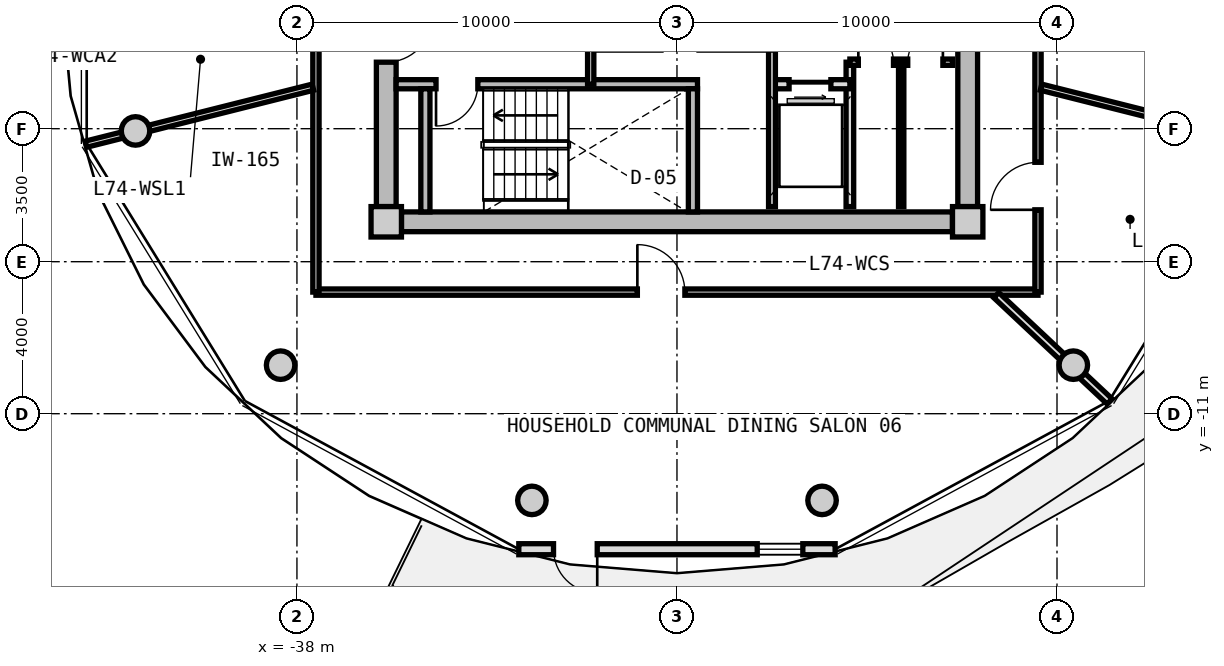
"""IFC4 building model, lengths in metres.
Left out: names, types, materials, properties, quantities, classifications, styles, units other than length and angle.
Written with IfcOpenShell. Run it as: python <this file> out.ifc"""

import sys

from ifc_helpers import new_model, si_unit, direction, frame, frame_2d, origin, origin_2d, place, context, subcontext, project, spatial, rectangle, circle, extrude, source, transform, mapped, element, fill, save


model = new_model("IFC4")
c1 = context("Model", 3, precision=1e-05, world=origin(), true_north=direction((0.0, 1.0)))
c2 = subcontext(c1, "Body", "Model", "MODEL_VIEW")
j1 = project(units=[si_unit("LENGTHUNIT", "METRE"), si_unit("PLANEANGLEUNIT", "RADIAN")], contexts=[c1])
p1 = place(None, origin())
s1 = spatial("IfcSite", under=j1, at=p1, CompositionType="ELEMENT")
p2 = place(p1, origin())
s2 = spatial("IfcBuilding", under=s1, at=p2, CompositionType="ELEMENT")
p3 = place(p2, frame((0.0, 0.0, 238.3)))
s3 = spatial("IfcBuildingStorey", under=s2, at=p3, CompositionType="ELEMENT", Elevation=238.3)
m1 = source(origin(), c2, "Body", "SweptSolid", [
    extrude(rectangle(XDim=0.8, YDim=0.8, at=origin_2d()), origin(), (0.0, 0.0, 1.0), 3.05),
])
for number, where, z_axis, x_axis in (
    (1, (-35.65, -5.95, 0.0), (0.0, 0.0, 1.0), (1.0, 0.0, 0.0)),
    (2, (-20.35, -5.95, 0.0), (0.0, 0.0, 1.0), (1.0, 0.0, 0.0)),
):
    element("IfcColumn", number, at=place(p3, frame(where, z_axis=z_axis, x_axis=x_axis)), inside=s3, PredefinedType="COLUMN", context=c2, shape_type="MappedRepresentation", body=[
        mapped(m1, transform((0.0, 0.0, 0.0), x_axis=(1.0, 0.0, 0.0), y_axis=(0.0, 1.0, 0.0), z_axis=(0.0, 0.0, 1.0), scale=1.0)),
    ])
m2 = source(origin(), c2, "Body", "SweptSolid", [
    extrude(rectangle(XDim=14.5, YDim=0.52, at=frame_2d((7.25, 0.0))), origin(), (0.0, 0.0, 1.0), 2.81),
])
p4 = place(p3, frame((-20.75, -5.95, 0.0), z_axis=(0.0, 0.0, 1.0), x_axis=(-1.0, 0.0, 0.0)))
e3 = element("IfcWall", 3, at=p4, inside=s3, PredefinedType="SHEAR", context=c2, shape_type="MappedRepresentation", body=[
    mapped(m2, transform((0.0, 0.0, 0.0), x_axis=(1.0, 0.0, 0.0), y_axis=(0.0, 1.0, 0.0), z_axis=(0.0, 0.0, 1.0), scale=1.0)),
])
m3 = source(origin(), c2, "Body", "SweptSolid", [
    extrude(rectangle(XDim=11.1, YDim=0.52, at=frame_2d((5.55, 0.0))), origin(), (0.0, 0.0, 1.0), 2.81),
])
p5 = place(p3, frame((-35.65, -5.55, 0.0), z_axis=(0.0, 0.0, 1.0), x_axis=(0.0, 1.0, 0.0)))
e4 = element("IfcWall", 4, at=p5, inside=s3, PredefinedType="SHEAR", context=c2, shape_type="MappedRepresentation", body=[
    mapped(m3, transform((0.0, 0.0, 0.0), x_axis=(1.0, 0.0, 0.0), y_axis=(0.0, 1.0, 0.0), z_axis=(0.0, 0.0, 1.0), scale=1.0)),
])
p6 = place(p5, frame((3.8, 0.0, 0.0)))
e5 = element("IfcOpeningElement", 5, at=p6, cuts=e4, PredefinedType="OPENING", context=c2, shape_type="SweptSolid", body=[
    extrude(rectangle(XDim=1.2, YDim=2.15, at=frame_2d((0.6, 1.075))), frame((0.0, 0.27, 0.0), z_axis=(0.0, -1.0, 0.0), x_axis=(1.0, 0.0, 0.0)), (0.0, 0.0, 1.0), 0.54),
])
p7 = place(p3, frame((-20.35, 5.55, 0.0), z_axis=(0.0, 0.0, 1.0), x_axis=(0.0, -1.0, 0.0)))
e6 = element("IfcWall", 6, at=p7, inside=s3, PredefinedType="SHEAR", context=c2, shape_type="MappedRepresentation", body=[
    mapped(m3, transform((0.0, 0.0, 0.0), x_axis=(1.0, 0.0, 0.0), y_axis=(0.0, 1.0, 0.0), z_axis=(0.0, 0.0, 1.0), scale=1.0)),
])
p8 = place(p7, frame((5.65, 0.0, 0.0)))
e7 = element("IfcOpeningElement", 7, at=p8, cuts=e6, PredefinedType="OPENING", context=c2, shape_type="SweptSolid", body=[
    extrude(rectangle(XDim=1.2, YDim=2.15, at=frame_2d((0.6, 1.075))), frame((0.0, 0.27, 0.0), z_axis=(0.0, -1.0, 0.0), x_axis=(1.0, 0.0, 0.0)), (0.0, 0.0, 1.0), 0.54),
])
m4 = source(origin(), c2, "Body", "SweptSolid", [
    extrude(circle(Radius=0.375, at=origin_2d()), origin(), (0.0, 0.0, 1.0), 3.05),
])
for number, where, z_axis, x_axis in (
    (8, (-42.247, -3.559, 0.0), (0.0, 0.0, 1.0), (1.0, 0.0, 0.0)),
    (9, (-38.43, -9.723, 0.0), (0.0, 0.0, 1.0), (1.0, 0.0, 0.0)),
    (10, (-31.818, -13.281, 0.0), (0.0, 0.0, 1.0), (1.0, 0.0, 0.0)),
    (11, (-24.182, -13.281, 0.0), (0.0, 0.0, 1.0), (1.0, 0.0, 0.0)),
    (12, (-17.57, -9.723, 0.0), (0.0, 0.0, 1.0), (1.0, 0.0, 0.0)),
):
    element("IfcColumn", number, at=place(p3, frame(where, z_axis=z_axis, x_axis=x_axis)), inside=s3, PredefinedType="COLUMN", context=c2, shape_type="MappedRepresentation", body=[
        mapped(m4, transform((0.0, 0.0, 0.0), x_axis=(1.0, 0.0, 0.0), y_axis=(0.0, 1.0, 0.0), z_axis=(0.0, 0.0, 1.0), scale=1.0)),
    ])
m5 = source(origin(), c2, "Body", "SweptSolid", [
    extrude(rectangle(XDim=8.324, YDim=0.29, at=frame_2d((4.162, 0.0))), origin(), (0.0, 0.0, 1.0), 2.81),
])
p9 = place(p3, frame((-23.838, -14.566, 0.0), z_axis=(0.0, 0.0, 1.0), x_axis=(-1.0, 0.0, 0.0)))
e13 = element("IfcWall", 13, at=p9, inside=s3, PredefinedType="SOLIDWALL", context=c2, shape_type="MappedRepresentation", body=[
    mapped(m5, transform((0.0, 0.0, 0.0), x_axis=(1.0, 0.0, 0.0), y_axis=(0.0, 1.0, 0.0), z_axis=(0.0, 0.0, 1.0), scale=1.0)),
])
p10 = place(p9, frame((6.26, 0.0, 0.0)))
e14 = element("IfcOpeningElement", 14, at=p10, cuts=e13, PredefinedType="OPENING", context=c2, shape_type="SweptSolid", body=[
    extrude(rectangle(XDim=1.15, YDim=2.25, at=frame_2d((0.575, 1.125))), frame((0.0, 0.155, 0.0), z_axis=(0.0, -1.0, 0.0), x_axis=(1.0, 0.0, 0.0)), (0.0, 0.0, 1.0), 0.31),
])
p11 = place(p9, frame((0.85, 0.0, 0.85)))
e15 = element("IfcOpeningElement", 15, at=p11, cuts=e13, PredefinedType="OPENING", context=c2, shape_type="SweptSolid", body=[
    extrude(rectangle(XDim=1.2, YDim=1.5, at=frame_2d((0.6, 0.75))), frame((0.0, 0.155, 0.0), z_axis=(0.0, -1.0, 0.0), x_axis=(1.0, 0.0, 0.0)), (0.0, 0.0, 1.0), 0.31),
])
m6 = source(origin(), c2, "Body", "SweptSolid", [
    extrude(rectangle(XDim=7.93, YDim=0.24, at=frame_2d((3.965, 0.0))), origin(), (0.0, 0.0, 1.0), 2.81),
])
p12 = place(p3, frame((-35.39, -2.33, 0.0), z_axis=(0.0, 0.0, 1.0), x_axis=(1.0, 0.0, 0.0)))
e16 = element("IfcWall", 16, at=p12, inside=s3, PredefinedType="PARTITIONING", context=c2, shape_type="MappedRepresentation", body=[
    mapped(m6, transform((0.0, 0.0, 0.0), x_axis=(1.0, 0.0, 0.0), y_axis=(0.0, 1.0, 0.0), z_axis=(0.0, 0.0, 1.0), scale=1.0)),
])
p13 = place(p12, frame((1.05, 0.0, 0.0)))
e17 = element("IfcOpeningElement", 17, at=p13, cuts=e16, PredefinedType="OPENING", context=c2, shape_type="SweptSolid", body=[
    extrude(rectangle(XDim=1.1, YDim=2.15, at=frame_2d((0.55, 1.075))), frame((0.0, 0.13, 0.0), z_axis=(0.0, -1.0, 0.0), x_axis=(1.0, 0.0, 0.0)), (0.0, 0.0, 1.0), 0.26),
])
m7 = source(origin(), c2, "Body", "SweptSolid", [
    extrude(rectangle(XDim=3.24, YDim=0.24, at=frame_2d((1.62, 0.0))), origin(), (0.0, 0.0, 1.0), 2.81),
])
for number, where, z_axis, x_axis in (
    (18, (-34.62, -5.69, 0.0), (0.0, 0.0, 1.0), (0.0, 1.0, 0.0)),
    (19, (-27.58, -5.69, 0.0), (0.0, 0.0, 1.0), (0.0, 1.0, 0.0)),
):
    element("IfcWall", number, at=place(p3, frame(where, z_axis=z_axis, x_axis=x_axis)), inside=s3, PredefinedType="PARTITIONING", context=c2, shape_type="MappedRepresentation", body=[
        mapped(m7, transform((0.0, 0.0, 0.0), x_axis=(1.0, 0.0, 0.0), y_axis=(0.0, 1.0, 0.0), z_axis=(0.0, 0.0, 1.0), scale=1.0)),
    ])
m8 = source(origin(), c2, "Body", "SweptSolid", [
    extrude(rectangle(XDim=3.8, YDim=0.2, at=frame_2d((1.9, 0.0))), origin(), (0.0, 0.0, 1.0), 2.795),
])
p14 = place(p3, frame((-23.45, -5.55, 0.0), z_axis=(0.0, 0.0, 1.0), x_axis=(0.0, 1.0, 0.0)))
e20 = element("IfcWall", 20, at=p14, inside=s3, PredefinedType="PARTITIONING", context=c2, shape_type="MappedRepresentation", body=[
    mapped(m8, transform((0.0, 0.0, 0.0), x_axis=(1.0, 0.0, 0.0), y_axis=(0.0, 1.0, 0.0), z_axis=(0.0, 0.0, 1.0), scale=1.0)),
])
m9 = source(origin(), c2, "Body", "SweptSolid", [
    extrude(rectangle(XDim=2.05, YDim=0.24, at=frame_2d((1.025, 0.0))), origin(), (0.0, 0.0, 1.0), 2.795),
])
p15 = place(p3, frame((-25.5, -2.33, 0.0), z_axis=(0.0, 0.0, 1.0), x_axis=(1.0, 0.0, 0.0)))
e21 = element("IfcWall", 21, at=p15, inside=s3, PredefinedType="PARTITIONING", context=c2, shape_type="MappedRepresentation", body=[
    mapped(m9, transform((0.0, 0.0, 0.0), x_axis=(1.0, 0.0, 0.0), y_axis=(0.0, 1.0, 0.0), z_axis=(0.0, 0.0, 1.0), scale=1.0)),
])
p16 = place(p15, frame((0.45, 0.0, 0.0)))
e22 = element("IfcOpeningElement", 22, at=p16, cuts=e21, PredefinedType="OPENING", context=c2, shape_type="SweptSolid", body=[
    extrude(rectangle(XDim=1.1, YDim=2.2, at=frame_2d((0.55, 1.1))), frame((0.0, 0.13, 0.0), z_axis=(0.0, -1.0, 0.0), x_axis=(1.0, 0.0, 0.0)), (0.0, 0.0, 1.0), 0.26),
])
m10 = source(origin(), c2, "Body", "SweptSolid", [
    extrude(rectangle(XDim=4.2, YDim=0.18, at=frame_2d((2.1, 0.0))), origin(), (0.0, 0.0, 1.0), 2.795),
])
p17 = place(p3, frame((-25.5, -5.55, 0.0), z_axis=(0.0, 0.0, 1.0), x_axis=(0.0, 1.0, 0.0)))
e23 = element("IfcWall", 23, at=p17, inside=s3, PredefinedType="PARTITIONING", context=c2, shape_type="MappedRepresentation", body=[
    mapped(m10, transform((0.0, 0.0, 0.0), x_axis=(1.0, 0.0, 0.0), y_axis=(0.0, 1.0, 0.0), z_axis=(0.0, 0.0, 1.0), scale=1.0)),
])
m11 = source(origin(), c2, "Body", "SweptSolid", [
    extrude(rectangle(XDim=0.98, YDim=0.165, at=frame_2d((0.49, 0.0))), origin(), (0.0, 0.0, 1.0), 2.795),
])
p18 = place(p3, frame((-30.27, -2.33, 0.0), z_axis=(0.0, 0.0, 1.0), x_axis=(0.0, 1.0, 0.0)))
e24 = element("IfcWall", 24, at=p18, inside=s3, PredefinedType="PARTITIONING", context=c2, shape_type="MappedRepresentation", body=[
    mapped(m11, transform((0.0, 0.0, 0.0), x_axis=(1.0, 0.0, 0.0), y_axis=(0.0, 1.0, 0.0), z_axis=(0.0, 0.0, 1.0), scale=1.0)),
])
m12 = source(origin(), c2, "Body", "SweptSolid", [
    extrude(rectangle(XDim=2.7, YDim=0.165, at=frame_2d((1.35, 0.0))), origin(), (0.0, 0.0, 1.0), 2.795),
])
p19 = place(p3, frame((-23.45, -1.75, 0.0), z_axis=(0.0, 0.0, 1.0), x_axis=(1.0, 0.0, 0.0)))
e25 = element("IfcWall", 25, at=p19, inside=s3, PredefinedType="PARTITIONING", context=c2, shape_type="MappedRepresentation", body=[
    mapped(m12, transform((0.0, 0.0, 0.0), x_axis=(1.0, 0.0, 0.0), y_axis=(0.0, 1.0, 0.0), z_axis=(0.0, 0.0, 1.0), scale=1.0)),
])
p20 = place(p19, frame((0.222, 0.0, 0.0)))
e26 = element("IfcOpeningElement", 26, at=p20, cuts=e25, PredefinedType="OPENING", context=c2, shape_type="SweptSolid", body=[
    extrude(rectangle(XDim=0.925, YDim=2.1, at=frame_2d((0.462, 1.05))), frame((0.0, 0.093, 0.0), z_axis=(0.0, -1.0, 0.0), x_axis=(1.0, 0.0, 0.0)), (0.0, 0.0, 1.0), 0.185),
])
p21 = place(p19, frame((1.522, 0.0, 0.0)))
e27 = element("IfcOpeningElement", 27, at=p21, cuts=e25, PredefinedType="OPENING", context=c2, shape_type="SweptSolid", body=[
    extrude(rectangle(XDim=0.925, YDim=2.1, at=frame_2d((0.462, 1.05))), frame((0.0, 0.093, 0.0), z_axis=(0.0, -1.0, 0.0), x_axis=(1.0, 0.0, 0.0)), (0.0, 0.0, 1.0), 0.185),
])
m13 = source(origin(), c2, "Body", "SweptSolid", [
    extrude(rectangle(XDim=3.8, YDim=0.14, at=frame_2d((1.9, 0.0))), origin(), (0.0, 0.0, 1.0), 2.795),
])
p22 = place(p3, frame((-22.1, -5.55, 0.0), z_axis=(0.0, 0.0, 1.0), x_axis=(0.0, 1.0, 0.0)))
e28 = element("IfcWall", 28, at=p22, inside=s3, PredefinedType="PARTITIONING", context=c2, shape_type="MappedRepresentation", body=[
    mapped(m13, transform((0.0, 0.0, 0.0), x_axis=(1.0, 0.0, 0.0), y_axis=(0.0, 1.0, 0.0), z_axis=(0.0, 0.0, 1.0), scale=1.0)),
])
m14 = source(origin(), c2, "Body", "SweptSolid", [
    extrude(rectangle(XDim=19.0, YDim=0.165, at=frame_2d((9.5, 0.0))), origin(), (0.0, 0.0, 1.0), 2.795),
])
p23 = place(p3, frame((-18.5, -7.8, 0.0), z_axis=(0.0, 0.0, 1.0), x_axis=(-1.0, 0.0, 0.0)))
e29 = element("IfcWall", 29, at=p23, inside=s3, PredefinedType="PARTITIONING", context=c2, shape_type="MappedRepresentation", body=[
    mapped(m14, transform((0.0, 0.0, 0.0), x_axis=(1.0, 0.0, 0.0), y_axis=(0.0, 1.0, 0.0), z_axis=(0.0, 0.0, 1.0), scale=1.0)),
])
p24 = place(p23, frame((9.292, 0.0, 0.0)))
e30 = element("IfcOpeningElement", 30, at=p24, cuts=e29, PredefinedType="OPENING", context=c2, shape_type="SweptSolid", body=[
    extrude(rectangle(XDim=1.25, YDim=2.2, at=frame_2d((0.625, 1.1))), frame((0.0, 0.093, 0.0), z_axis=(0.0, -1.0, 0.0), x_axis=(1.0, 0.0, 0.0)), (0.0, 0.0, 1.0), 0.185),
])
m15 = source(origin(), c2, "Body", "SweptSolid", [
    extrude(rectangle(XDim=6.88, YDim=0.165, at=frame_2d((3.44, 0.0))), origin(), (0.0, 0.0, 1.0), 2.795),
])
p25 = place(p3, frame((-37.5, -7.8, 0.0), z_axis=(0.0, 0.0, 1.0), x_axis=(0.0, 1.0, 0.0)))
e31 = element("IfcWall", 31, at=p25, inside=s3, PredefinedType="PARTITIONING", context=c2, shape_type="MappedRepresentation", body=[
    mapped(m15, transform((0.0, 0.0, 0.0), x_axis=(1.0, 0.0, 0.0), y_axis=(0.0, 1.0, 0.0), z_axis=(0.0, 0.0, 1.0), scale=1.0)),
])
p26 = place(p3, frame((-18.5, -0.92, 0.0), z_axis=(0.0, 0.0, 1.0), x_axis=(0.0, -1.0, 0.0)))
e32 = element("IfcWall", 32, at=p26, inside=s3, PredefinedType="PARTITIONING", context=c2, shape_type="MappedRepresentation", body=[
    mapped(m15, transform((0.0, 0.0, 0.0), x_axis=(1.0, 0.0, 0.0), y_axis=(0.0, 1.0, 0.0), z_axis=(0.0, 0.0, 1.0), scale=1.0)),
])
p27 = place(p26, frame((3.464, 0.0, 0.0)))
e33 = element("IfcOpeningElement", 33, at=p27, cuts=e32, PredefinedType="OPENING", context=c2, shape_type="SweptSolid", body=[
    extrude(rectangle(XDim=1.25, YDim=2.2, at=frame_2d((0.625, 1.1))), frame((0.0, 0.093, 0.0), z_axis=(0.0, -1.0, 0.0), x_axis=(1.0, 0.0, 0.0)), (0.0, 0.0, 1.0), 0.185),
])
m16 = source(origin(), c2, "Body", "SweptSolid", [
    extrude(rectangle(XDim=6.157, YDim=0.165, at=frame_2d((3.079, 0.0))), origin(), (0.0, 0.0, 1.0), 2.395),
])
for number, where, z_axis, x_axis in (
    (34, (-37.58, -2.407, 0.0), (0.0, 0.0, 1.0), (-0.97, -0.244, 0.0)),
    (35, (-18.42, -2.407, 0.0), (0.0, 0.0, 1.0), (0.97, -0.244, 0.0)),
):
    element("IfcWall", number, at=place(p3, frame(where, z_axis=z_axis, x_axis=x_axis)), inside=s3, PredefinedType="PARTITIONING", context=c2, shape_type="MappedRepresentation", body=[
        mapped(m16, transform((0.0, 0.0, 0.0), x_axis=(1.0, 0.0, 0.0), y_axis=(0.0, 1.0, 0.0), z_axis=(0.0, 0.0, 1.0), scale=1.0)),
    ])
m17 = source(origin(), c2, "Body", "SweptSolid", [
    extrude(rectangle(XDim=4.089, YDim=0.19, at=frame_2d((2.044, 0.0))), origin(), (0.0, 0.0, 1.0), 2.395),
])
p28 = place(p3, frame((-19.598, -7.88, 0.0), z_axis=(0.0, 0.0, 1.0), x_axis=(0.729401273609, -0.684086092577, 0.0)))
e36 = element("IfcWall", 36, at=p28, inside=s3, PredefinedType="PARTITIONING", context=c2, shape_type="MappedRepresentation", body=[
    mapped(m17, transform((0.0, 0.0, 0.0), x_axis=(1.0, 0.0, 0.0), y_axis=(0.0, 1.0, 0.0), z_axis=(0.0, 0.0, 1.0), scale=1.0)),
])
m18 = source(origin(), c2, "Body", "SweptSolid", [
    extrude(rectangle(XDim=1.15, YDim=2.25, at=frame_2d((0.575, 1.125))), frame((0.0, 0.025, 0.0), z_axis=(0.0, -1.0, 0.0), x_axis=(1.0, 0.0, 0.0)), (0.0, 0.0, 1.0), 0.05),
])
p29 = place(p10, origin())
e37 = element("IfcDoor", 37, at=p29, inside=s3, OperationType="SINGLE_SWING_LEFT", PredefinedType="DOOR", context=c2, shape_type="MappedRepresentation", body=[
    mapped(m18, transform((0.0, 0.0, 0.0), x_axis=(1.0, 0.0, 0.0), y_axis=(0.0, 1.0, 0.0), z_axis=(0.0, 0.0, 1.0), scale=1.0)),
])
fill(e14, e37)
m19 = source(origin(), c2, "Body", "SweptSolid", [
    extrude(rectangle(XDim=1.2, YDim=1.5, at=frame_2d((0.6, 0.75))), frame((0.0, 0.03, 0.0), z_axis=(0.0, -1.0, 0.0), x_axis=(1.0, 0.0, 0.0)), (0.0, 0.0, 1.0), 0.06),
])
p30 = place(p11, origin())
e38 = element("IfcWindow", 38, at=p30, inside=s3, PartitioningType="SINGLE_PANEL", PredefinedType="WINDOW", context=c2, shape_type="MappedRepresentation", body=[
    mapped(m19, transform((0.0, 0.0, 0.0), x_axis=(1.0, 0.0, 0.0), y_axis=(0.0, 1.0, 0.0), z_axis=(0.0, 0.0, 1.0), scale=1.0)),
])
fill(e15, e38)
m20 = source(origin(), c2, "Body", "SweptSolid", [
    extrude(rectangle(XDim=1.1, YDim=2.15, at=frame_2d((0.55, 1.075))), frame((0.0, 0.025, 0.0), z_axis=(0.0, -1.0, 0.0), x_axis=(1.0, 0.0, 0.0)), (0.0, 0.0, 1.0), 0.05),
])
p31 = place(p13, frame((1.1, 0.0, 0.0), z_axis=(0.0, 0.0, 1.0), x_axis=(-1.0, 0.0, 0.0)))
e39 = element("IfcDoor", 39, at=p31, inside=s3, OperationType="SINGLE_SWING_RIGHT", PredefinedType="DOOR", context=c2, shape_type="MappedRepresentation", body=[
    mapped(m20, transform((0.0, 0.0, 0.0), x_axis=(1.0, 0.0, 0.0), y_axis=(0.0, 1.0, 0.0), z_axis=(0.0, 0.0, 1.0), scale=1.0)),
])
fill(e17, e39)
m21 = source(origin(), c2, "Body", "SweptSolid", [
    extrude(rectangle(XDim=1.2, YDim=2.15, at=frame_2d((0.6, 1.075))), frame((0.0, 0.025, 0.0), z_axis=(0.0, -1.0, 0.0), x_axis=(1.0, 0.0, 0.0)), (0.0, 0.0, 1.0), 0.05),
])
p32 = place(p6, frame((1.2, 0.0, 0.0), z_axis=(0.0, 0.0, 1.0), x_axis=(-1.0, 0.0, 0.0)))
e40 = element("IfcDoor", 40, at=p32, inside=s3, OperationType="SINGLE_SWING_LEFT", PredefinedType="DOOR", context=c2, shape_type="MappedRepresentation", body=[
    mapped(m21, transform((0.0, 0.0, 0.0), x_axis=(1.0, 0.0, 0.0), y_axis=(0.0, 1.0, 0.0), z_axis=(0.0, 0.0, 1.0), scale=1.0)),
])
fill(e5, e40)
m22 = source(origin(), c2, "Body", "SweptSolid", [
    extrude(rectangle(XDim=1.1, YDim=2.2, at=frame_2d((0.55, 1.1))), frame((0.0, 0.025, 0.0), z_axis=(0.0, -1.0, 0.0), x_axis=(1.0, 0.0, 0.0)), (0.0, 0.0, 1.0), 0.05),
])
p33 = place(p16, frame((1.1, 0.0, 0.0), z_axis=(0.0, 0.0, 1.0), x_axis=(-1.0, 0.0, 0.0)))
e41 = element("IfcDoor", 41, at=p33, inside=s3, OperationType="SLIDING_TO_RIGHT", PredefinedType="DOOR", context=c2, shape_type="MappedRepresentation", body=[
    mapped(m22, transform((0.0, 0.0, 0.0), x_axis=(1.0, 0.0, 0.0), y_axis=(0.0, 1.0, 0.0), z_axis=(0.0, 0.0, 1.0), scale=1.0)),
])
fill(e22, e41)
m23 = source(origin(), c2, "Body", "SweptSolid", [
    extrude(rectangle(XDim=0.925, YDim=2.1, at=frame_2d((0.462, 1.05))), frame((0.0, 0.025, 0.0), z_axis=(0.0, -1.0, 0.0), x_axis=(1.0, 0.0, 0.0)), (0.0, 0.0, 1.0), 0.05),
])
p34 = place(p20, origin())
e42 = element("IfcDoor", 42, at=p34, inside=s3, OperationType="SINGLE_SWING_LEFT", PredefinedType="DOOR", context=c2, shape_type="MappedRepresentation", body=[
    mapped(m23, transform((0.0, 0.0, 0.0), x_axis=(1.0, 0.0, 0.0), y_axis=(0.0, 1.0, 0.0), z_axis=(0.0, 0.0, 1.0), scale=1.0)),
])
fill(e26, e42)
p35 = place(p21, origin())
e43 = element("IfcDoor", 43, at=p35, inside=s3, OperationType="SINGLE_SWING_RIGHT", PredefinedType="DOOR", context=c2, shape_type="MappedRepresentation", body=[
    mapped(m23, transform((0.0, 0.0, 0.0), x_axis=(1.0, 0.0, 0.0), y_axis=(0.0, 1.0, 0.0), z_axis=(0.0, 0.0, 1.0), scale=1.0)),
])
fill(e27, e43)
m24 = source(origin(), c2, "Body", "SweptSolid", [
    extrude(rectangle(XDim=1.25, YDim=2.2, at=frame_2d((0.625, 1.1))), frame((0.0, 0.025, 0.0), z_axis=(0.0, -1.0, 0.0), x_axis=(1.0, 0.0, 0.0)), (0.0, 0.0, 1.0), 0.05),
])
p36 = place(p24, frame((1.25, 0.0, 0.0), z_axis=(0.0, 0.0, 1.0), x_axis=(-1.0, 0.0, 0.0)))
e44 = element("IfcDoor", 44, at=p36, inside=s3, OperationType="SINGLE_SWING_LEFT", PredefinedType="DOOR", context=c2, shape_type="MappedRepresentation", body=[
    mapped(m24, transform((0.0, 0.0, 0.0), x_axis=(1.0, 0.0, 0.0), y_axis=(0.0, 1.0, 0.0), z_axis=(0.0, 0.0, 1.0), scale=1.0)),
])
fill(e30, e44)
p37 = place(p27, frame((1.25, 0.0, 0.0), z_axis=(0.0, 0.0, 1.0), x_axis=(-1.0, 0.0, 0.0)))
e45 = element("IfcDoor", 45, at=p37, inside=s3, OperationType="SINGLE_SWING_LEFT", PredefinedType="DOOR", context=c2, shape_type="MappedRepresentation", body=[
    mapped(m24, transform((0.0, 0.0, 0.0), x_axis=(1.0, 0.0, 0.0), y_axis=(0.0, 1.0, 0.0), z_axis=(0.0, 0.0, 1.0), scale=1.0)),
])
fill(e33, e45)
save(model, sys.argv[1])
